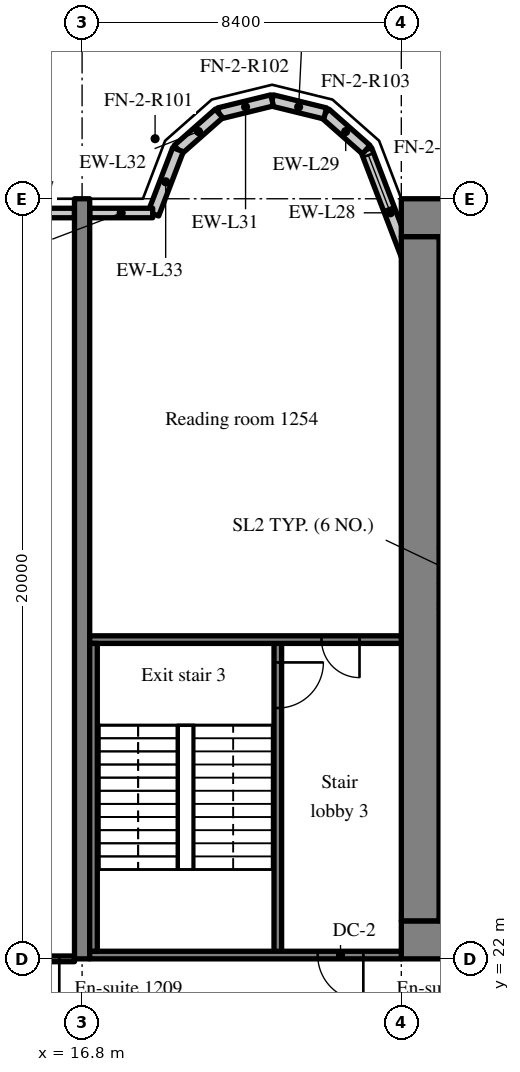
"""IFC4 building model, lengths in metres.
Left out: names, types, materials, properties, quantities, classifications, styles, units other than length and angle.
Written with IfcOpenShell. Run it as: python <this file> out.ifc"""

import sys

from ifc_helpers import new_model, si_unit, direction, frame, frame_2d, origin, place, context, subcontext, project, spatial, rectangle, extrude, source, transform, mapped, element, fill, save


model = new_model("IFC4")
c1 = context("Model", 3, precision=1e-05, world=origin(), true_north=direction((0.0, 1.0)))
c2 = subcontext(c1, "Body", "Model", "MODEL_VIEW")
j1 = project(units=[si_unit("LENGTHUNIT", "METRE"), si_unit("PLANEANGLEUNIT", "RADIAN")], contexts=[c1])
p1 = place(None, origin())
s1 = spatial("IfcSite", under=j1, at=p1, CompositionType="ELEMENT")
p2 = place(p1, origin())
s2 = spatial("IfcBuilding", under=s1, at=p2, CompositionType="ELEMENT")
p3 = place(p2, frame((0.0, 0.0, 54.4)))
s3 = spatial("IfcBuildingStorey", under=s2, at=p3, CompositionType="ELEMENT", Elevation=54.4)
m1 = source(origin(), c2, "Body", "SweptSolid", [
    extrude(rectangle(XDim=50.4, YDim=1.0, at=frame_2d((25.2, 0.0))), origin(), (0.0, 0.0, 1.0), 3.52),
])
p4 = place(p3, frame((25.2, 22.5, 0.0), z_axis=(0.0, 0.0, 1.0), x_axis=(1.0, 0.0, 0.0)))
e1 = element("IfcWall", 1, at=p4, inside=s3, PredefinedType="SHEAR", context=c2, shape_type="MappedRepresentation", body=[
    mapped(m1, transform((0.0, 0.0, 0.0), scale=1.0)),
])
m2 = source(origin(), c2, "Body", "SweptSolid", [
    extrude(rectangle(XDim=1.8, YDim=2.1, at=frame_2d((0.9, 1.05))), frame((0.0, 0.51, 0.0), z_axis=(0.0, -1.0, 0.0), x_axis=(1.0, 0.0, 0.0)), (0.0, 0.0, 1.0), 1.02),
])
p5 = place(p4, frame((15.9, 0.0, 0.0)))
e2 = element("IfcOpeningElement", 2, at=p5, cuts=e1, PredefinedType="OPENING", context=c2, shape_type="MappedRepresentation", body=[
    mapped(m2, transform((0.0, 0.0, 0.0), scale=1.0)),
])
m3 = source(origin(), c2, "Body", "SweptSolid", [
    extrude(rectangle(XDim=1.2, YDim=2.1, at=frame_2d((0.6, 1.05))), frame((0.0, 0.51, 0.0), z_axis=(0.0, -1.0, 0.0), x_axis=(1.0, 0.0, 0.0)), (0.0, 0.0, 1.0), 1.02),
])
p6 = place(p4, frame((26.987, 0.0, 0.0)))
e3 = element("IfcOpeningElement", 3, at=p6, cuts=e1, PredefinedType="OPENING", context=c2, shape_type="MappedRepresentation", body=[
    mapped(m3, transform((0.0, 0.0, 0.0), scale=1.0)),
])
m4 = source(origin(), c2, "Body", "SweptSolid", [
    extrude(rectangle(XDim=0.9, YDim=2.1, at=frame_2d((0.45, 1.05))), frame((0.0, 0.51, 0.0), z_axis=(0.0, -1.0, 0.0), x_axis=(1.0, 0.0, 0.0)), (0.0, 0.0, 1.0), 1.02),
])
p7 = place(p4, frame((33.75, 0.0, 0.0)))
e4 = element("IfcOpeningElement", 4, at=p7, cuts=e1, PredefinedType="OPENING", context=c2, shape_type="MappedRepresentation", body=[
    mapped(m4, transform((0.0, 0.0, 0.0), scale=1.0)),
])
p8 = place(p4, frame((30.75, 0.0, 0.0)))
e5 = element("IfcOpeningElement", 5, at=p8, cuts=e1, PredefinedType="OPENING", context=c2, shape_type="MappedRepresentation", body=[
    mapped(m4, transform((0.0, 0.0, 0.0), scale=1.0)),
])
p9 = place(p4, frame((38.262, 0.0, 0.0)))
e6 = element("IfcOpeningElement", 6, at=p9, cuts=e1, PredefinedType="OPENING", context=c2, shape_type="MappedRepresentation", body=[
    mapped(m4, transform((0.0, 0.0, 0.0), scale=1.0)),
])
p10 = place(p4, frame((6.438, 0.0, 0.0)))
e7 = element("IfcOpeningElement", 7, at=p10, cuts=e1, PredefinedType="OPENING", context=c2, shape_type="MappedRepresentation", body=[
    mapped(m3, transform((0.0, 0.0, 0.0), scale=1.0)),
])
p11 = place(p4, frame((47.725, 0.0, 0.0)))
e8 = element("IfcOpeningElement", 8, at=p11, cuts=e1, PredefinedType="OPENING", context=c2, shape_type="MappedRepresentation", body=[
    mapped(m3, transform((0.0, 0.0, 0.0), scale=1.0)),
])
p12 = place(p3, frame((25.2, 41.5, 0.0), z_axis=(0.0, 0.0, 1.0), x_axis=(1.0, 0.0, 0.0)))
e9 = element("IfcWall", 9, at=p12, inside=s3, PredefinedType="SHEAR", context=c2, shape_type="MappedRepresentation", body=[
    mapped(m1, transform((0.0, 0.0, 0.0), scale=1.0)),
])
m5 = source(origin(), c2, "Body", "SweptSolid", [
    extrude(rectangle(XDim=18.0, YDim=1.0, at=frame_2d((9.0, 0.0))), origin(), (0.0, 0.0, 1.0), 3.52),
])
p13 = place(p3, frame((25.7, 23.0, 0.0), z_axis=(0.0, 0.0, 1.0), x_axis=(0.0, 1.0, 0.0)))
e10 = element("IfcWall", 10, at=p13, inside=s3, PredefinedType="SHEAR", context=c2, shape_type="MappedRepresentation", body=[
    mapped(m5, transform((0.0, 0.0, 0.0), scale=1.0)),
])
m6 = source(origin(), c2, "Body", "SweptSolid", [
    extrude(rectangle(XDim=20.0, YDim=0.4, at=frame_2d((10.0, 0.0))), origin(), (0.0, 0.0, 1.0), 3.52),
])
p14 = place(p3, frame((16.8, 22.0, 0.0), z_axis=(0.0, 0.0, 1.0), x_axis=(0.0, 1.0, 0.0)))
e11 = element("IfcWall", 11, at=p14, inside=s3, PredefinedType="SHEAR", context=c2, shape_type="MappedRepresentation", body=[
    mapped(m6, transform((0.0, 0.0, 0.0), scale=1.0)),
])
m7 = source(origin(), c2, "Body", "SweptSolid", [
    extrude(rectangle(XDim=3.559, YDim=0.3, at=frame_2d((1.78, 0.0))), origin(), (0.0, 0.0, 1.0), 3.52),
])
p15 = place(p3, frame((25.55, 39.969, 0.0), z_axis=(0.0, 0.0, 1.0), x_axis=(-0.35779745313, 0.933799219604, 0.0)))
e12 = element("IfcWall", 12, at=p15, inside=s3, PredefinedType="SOLIDWALL", context=c2, shape_type="MappedRepresentation", body=[
    mapped(m7, transform((0.0, 0.0, 0.0), scale=1.0)),
])
m8 = source(origin(), c2, "Body", "SweptSolid", [
    extrude(rectangle(XDim=1.5, YDim=2.0, at=frame_2d((0.75, 1.0))), frame((0.0, 0.16, 0.0), z_axis=(0.0, -1.0, 0.0), x_axis=(1.0, 0.0, 0.0)), (0.0, 0.0, 1.0), 0.32),
])
p16 = place(p15, frame((1.903, 0.0, 0.9)))
e13 = element("IfcOpeningElement", 13, at=p16, cuts=e12, PredefinedType="OPENING", context=c2, shape_type="MappedRepresentation", body=[
    mapped(m8, transform((0.0, 0.0, 0.0), scale=1.0)),
])
m9 = source(origin(), c2, "Body", "SweptSolid", [
    extrude(rectangle(XDim=1.44, YDim=0.3, at=frame_2d((0.72, 0.0))), origin(), (0.0, 0.0, 1.0), 3.52),
])
p17 = place(p3, frame((24.277, 43.292, 0.0), z_axis=(0.0, 0.0, 1.0), x_axis=(-0.749649827867, 0.661834673902, 0.0)))
e14 = element("IfcWall", 14, at=p17, inside=s3, PredefinedType="SOLIDWALL", context=c2, shape_type="MappedRepresentation", body=[
    mapped(m9, transform((0.0, 0.0, 0.0), scale=1.0)),
])
m10 = source(origin(), c2, "Body", "SweptSolid", [
    extrude(rectangle(XDim=1.438, YDim=0.3, at=frame_2d((0.719, 0.0))), origin(), (0.0, 0.0, 1.0), 3.52),
])
p18 = place(p3, frame((23.197, 44.245, 0.0), z_axis=(0.0, 0.0, 1.0), x_axis=(-0.971152283879, 0.238460146601, 0.0)))
e15 = element("IfcWall", 15, at=p18, inside=s3, PredefinedType="SOLIDWALL", context=c2, shape_type="MappedRepresentation", body=[
    mapped(m10, transform((0.0, 0.0, 0.0), scale=1.0)),
])
m11 = source(origin(), c2, "Body", "SweptSolid", [
    extrude(rectangle(XDim=1.439, YDim=0.3, at=frame_2d((0.719, 0.0))), origin(), (0.0, 0.0, 1.0), 3.52),
])
p19 = place(p3, frame((21.8, 44.588, 0.0), z_axis=(0.0, 0.0, 1.0), x_axis=(-0.971161932466, -0.238420848351, 0.0)))
e16 = element("IfcWall", 16, at=p19, inside=s3, PredefinedType="SOLIDWALL", context=c2, shape_type="MappedRepresentation", body=[
    mapped(m11, transform((0.0, 0.0, 0.0), scale=1.0)),
])
m12 = source(origin(), c2, "Body", "SweptSolid", [
    extrude(rectangle(XDim=1.44, YDim=0.3, at=frame_2d((0.72, 0.0))), origin(), (0.0, 0.0, 1.0), 3.52),
])
p20 = place(p3, frame((20.403, 44.245, 0.0), z_axis=(0.0, 0.0, 1.0), x_axis=(-0.74957555648, -0.661918790432, 0.0)))
e17 = element("IfcWall", 17, at=p20, inside=s3, PredefinedType="SOLIDWALL", context=c2, shape_type="MappedRepresentation", body=[
    mapped(m12, transform((0.0, 0.0, 0.0), scale=1.0)),
])
m13 = source(origin(), c2, "Body", "SweptSolid", [
    extrude(rectangle(XDim=1.812, YDim=0.3, at=frame_2d((0.906, 0.0))), origin(), (0.0, 0.0, 1.0), 3.52),
])
p21 = place(p3, frame((19.323, 43.292, 0.0), z_axis=(0.0, 0.0, 1.0), x_axis=(-0.357877270961, -0.93376863244, 0.0)))
e18 = element("IfcWall", 18, at=p21, inside=s3, PredefinedType="SOLIDWALL", context=c2, shape_type="MappedRepresentation", body=[
    mapped(m13, transform((0.0, 0.0, 0.0), scale=1.0)),
])
m14 = source(origin(), c2, "Body", "SweptSolid", [
    extrude(rectangle(XDim=3.6, YDim=0.25, at=frame_2d((1.8, 0.0))), origin(), (0.0, 0.0, 1.0), 2.82),
])
p22 = place(p3, frame((16.6, 41.625, 0.0), z_axis=(0.0, 0.0, 1.0), x_axis=(-1.0, 0.0, 0.0)))
e19 = element("IfcWall", 19, at=p22, inside=s3, PredefinedType="SOLIDWALL", context=c2, shape_type="MappedRepresentation", body=[
    mapped(m14, transform((0.0, 0.0, 0.0), scale=1.0)),
])
m15 = source(origin(), c2, "Body", "SweptSolid", [
    extrude(rectangle(XDim=1.5, YDim=1.5, at=frame_2d((0.75, 0.75))), frame((0.0, 0.135, 0.0), z_axis=(0.0, -1.0, 0.0), x_axis=(1.0, 0.0, 0.0)), (0.0, 0.0, 1.0), 0.27),
])
p23 = place(p22, frame((1.05, 0.0, 0.9)))
e20 = element("IfcOpeningElement", 20, at=p23, cuts=e19, PredefinedType="OPENING", context=c2, shape_type="MappedRepresentation", body=[
    mapped(m15, transform((0.0, 0.0, 0.0), scale=1.0)),
])
m16 = source(origin(), c2, "Body", "SweptSolid", [
    extrude(rectangle(XDim=1.658, YDim=0.25, at=frame_2d((0.829, 0.0))), origin(), (0.0, 0.0, 1.0), 2.82),
])
p24 = place(p3, frame((18.658, 41.625, 0.0), z_axis=(0.0, 0.0, 1.0), x_axis=(-1.0, 0.0, 0.0)))
e21 = element("IfcWall", 21, at=p24, inside=s3, PredefinedType="SOLIDWALL", context=c2, shape_type="MappedRepresentation", body=[
    mapped(m16, transform((0.0, 0.0, 0.0), scale=1.0)),
])
m17 = source(origin(), c2, "Body", "SweptSolid", [
    extrude(rectangle(XDim=8.3, YDim=0.2, at=frame_2d((4.15, 0.0))), origin(), (0.0, 0.0, 1.0), 3.52),
])
p25 = place(p3, frame((21.95, 22.1, 0.0), z_axis=(0.0, 0.0, 1.0), x_axis=(0.0, 1.0, 0.0)))
e22 = element("IfcWall", 22, at=p25, inside=s3, PredefinedType="SOLIDWALL", context=c2, shape_type="MappedRepresentation", body=[
    mapped(m17, transform((0.0, 0.0, 0.0), scale=1.0)),
])
m18 = source(origin(), c2, "Body", "SweptSolid", [
    extrude(rectangle(XDim=1.2, YDim=2.1, at=frame_2d((0.6, 1.05))), frame((0.0, 0.11, 0.0), z_axis=(0.0, -1.0, 0.0), x_axis=(1.0, 0.0, 0.0)), (0.0, 0.0, 1.0), 0.22),
])
p26 = place(p25, frame((6.5, 0.0, 0.0)))
e23 = element("IfcOpeningElement", 23, at=p26, cuts=e22, PredefinedType="OPENING", context=c2, shape_type="MappedRepresentation", body=[
    mapped(m18, transform((0.0, 0.0, 0.0), scale=1.0)),
])
m19 = source(origin(), c2, "Body", "SweptSolid", [
    extrude(rectangle(XDim=8.2, YDim=0.2, at=frame_2d((4.1, 0.0))), origin(), (0.0, 0.0, 1.0), 3.52),
])
p27 = place(p3, frame((17.0, 22.1, 0.0), z_axis=(0.0, 0.0, 1.0), x_axis=(1.0, 0.0, 0.0)))
e24 = element("IfcWall", 24, at=p27, inside=s3, PredefinedType="SOLIDWALL", context=c2, shape_type="MappedRepresentation", body=[
    mapped(m19, transform((0.0, 0.0, 0.0), scale=1.0)),
])
p28 = place(p27, frame((6.0, 0.0, 0.0)))
e25 = element("IfcOpeningElement", 25, at=p28, cuts=e24, PredefinedType="OPENING", context=c2, shape_type="MappedRepresentation", body=[
    mapped(m18, transform((0.0, 0.0, 0.0), scale=1.0)),
])
p29 = place(p3, frame((17.0, 30.4, 0.0), z_axis=(0.0, 0.0, 1.0), x_axis=(1.0, 0.0, 0.0)))
e26 = element("IfcWall", 26, at=p29, inside=s3, PredefinedType="SOLIDWALL", context=c2, shape_type="MappedRepresentation", body=[
    mapped(m19, transform((0.0, 0.0, 0.0), scale=1.0)),
])
m20 = source(origin(), c2, "Body", "SweptSolid", [
    extrude(rectangle(XDim=1.0, YDim=2.1, at=frame_2d((0.5, 1.05))), frame((0.0, 0.11, 0.0), z_axis=(0.0, -1.0, 0.0), x_axis=(1.0, 0.0, 0.0)), (0.0, 0.0, 1.0), 0.22),
])
p30 = place(p29, frame((6.1, 0.0, 0.0)))
e27 = element("IfcOpeningElement", 27, at=p30, cuts=e26, PredefinedType="OPENING", context=c2, shape_type="MappedRepresentation", body=[
    mapped(m20, transform((0.0, 0.0, 0.0), scale=1.0)),
])
m21 = source(origin(), c2, "Body", "SweptSolid", [
    extrude(rectangle(XDim=8.1, YDim=0.2, at=frame_2d((4.05, 0.0))), origin(), (0.0, 0.0, 1.0), 3.52),
])
p31 = place(p3, frame((17.1, 22.2, 0.0), z_axis=(0.0, 0.0, 1.0), x_axis=(0.0, 1.0, 0.0)))
e28 = element("IfcWall", 28, at=p31, inside=s3, PredefinedType="SOLIDWALL", context=c2, shape_type="MappedRepresentation", body=[
    mapped(m21, transform((0.0, 0.0, 0.0), scale=1.0)),
])
m22 = source(origin(), c2, "Body", "SweptSolid", [
    extrude(rectangle(XDim=8.0, YDim=0.15, at=frame_2d((4.0, 0.0))), origin(), (0.0, 0.0, 1.0), 2.82),
])
p32 = place(p3, frame((8.6, 22.0, 0.0), z_axis=(0.0, 0.0, 1.0), x_axis=(1.0, 0.0, 0.0)))
e29 = element("IfcWall", 29, at=p32, inside=s3, PredefinedType="PARTITIONING", context=c2, shape_type="MappedRepresentation", body=[
    mapped(m22, transform((0.0, 0.0, 0.0), scale=1.0)),
])
m23 = source(origin(), c2, "Body", "SweptSolid", [
    extrude(rectangle(XDim=1.0, YDim=2.1, at=frame_2d((0.5, 1.05))), frame((0.0, 0.085, 0.0), z_axis=(0.0, -1.0, 0.0), x_axis=(1.0, 0.0, 0.0)), (0.0, 0.0, 1.0), 0.17),
])
p33 = place(p32, frame((6.6, 0.0, 0.0)))
e30 = element("IfcOpeningElement", 30, at=p33, cuts=e29, PredefinedType="OPENING", context=c2, shape_type="MappedRepresentation", body=[
    mapped(m23, transform((0.0, 0.0, 0.0), scale=1.0)),
])
m24 = source(origin(), c2, "Body", "SweptSolid", [
    extrude(rectangle(XDim=1.5, YDim=2.0, at=frame_2d((0.75, 1.0))), frame((0.0, 0.03, 0.0), z_axis=(0.0, -1.0, 0.0), x_axis=(1.0, 0.0, 0.0)), (0.0, 0.0, 1.0), 0.06),
])
p34 = place(p16, origin())
e31 = element("IfcWindow", 31, at=p34, inside=s3, PartitioningType="SINGLE_PANEL", PredefinedType="WINDOW", context=c2, shape_type="MappedRepresentation", body=[
    mapped(m24, transform((0.0, 0.0, 0.0), scale=1.0)),
])
fill(e13, e31)
m25 = source(origin(), c2, "Body", "SweptSolid", [
    extrude(rectangle(XDim=1.2, YDim=2.1, at=frame_2d((0.6, 1.05))), frame((0.0, 0.025, 0.0), z_axis=(0.0, -1.0, 0.0), x_axis=(1.0, 0.0, 0.0)), (0.0, 0.0, 1.0), 0.05),
])
p35 = place(p26, origin())
e32 = element("IfcDoor", 32, at=p35, inside=s3, OperationType="SINGLE_SWING_RIGHT", PredefinedType="DOOR", context=c2, shape_type="MappedRepresentation", body=[
    mapped(m25, transform((0.0, 0.0, 0.0), scale=1.0)),
])
fill(e23, e32)
p36 = place(p28, origin())
e33 = element("IfcDoor", 33, at=p36, inside=s3, OperationType="SINGLE_SWING_RIGHT", PredefinedType="DOOR", context=c2, shape_type="MappedRepresentation", body=[
    mapped(m25, transform((0.0, 0.0, 0.0), scale=1.0)),
])
fill(e25, e33)
m26 = source(origin(), c2, "Body", "SweptSolid", [
    extrude(rectangle(XDim=1.0, YDim=2.1, at=frame_2d((0.5, 1.05))), frame((0.0, 0.025, 0.0), z_axis=(0.0, -1.0, 0.0), x_axis=(1.0, 0.0, 0.0)), (0.0, 0.0, 1.0), 0.05),
])
p37 = place(p30, origin())
e34 = element("IfcDoor", 34, at=p37, inside=s3, OperationType="SINGLE_SWING_RIGHT", PredefinedType="DOOR", context=c2, shape_type="MappedRepresentation", body=[
    mapped(m26, transform((0.0, 0.0, 0.0), scale=1.0)),
])
fill(e27, e34)
p38 = place(p33, origin())
e35 = element("IfcDoor", 35, at=p38, inside=s3, OperationType="SINGLE_SWING_RIGHT", PredefinedType="DOOR", context=c2, shape_type="MappedRepresentation", body=[
    mapped(m26, transform((0.0, 0.0, 0.0), scale=1.0)),
])
fill(e30, e35)
save(model, sys.argv[1])
